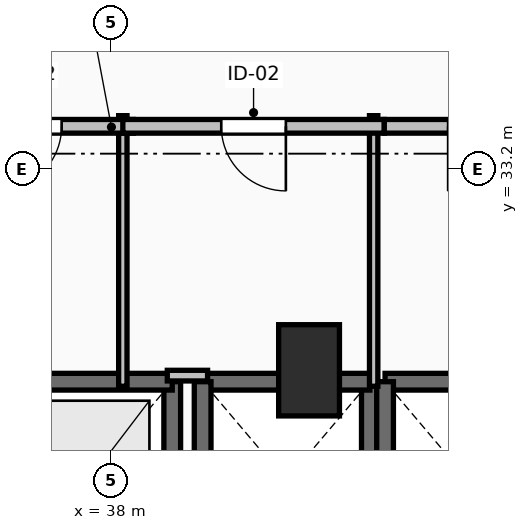
"""IFC4 building model, lengths in metres.
Left out: names, types, materials, properties, quantities, classifications, styles, units other than length and angle.
Written with IfcOpenShell. Run it as: python <this file> out.ifc"""

import sys

from ifc_helpers import new_model, si_unit, direction, frame, frame_2d, origin, origin_2d, place, context, subcontext, project, spatial, rectangle, extrude, element, fill, save


model = new_model("IFC4")
c1 = context("Model", 3, precision=1e-05, world=origin(), true_north=direction((0.0, 1.0)))
c2 = subcontext(c1, "Body", "Model", "MODEL_VIEW")
j1 = project(units=[si_unit("LENGTHUNIT", "METRE"), si_unit("PLANEANGLEUNIT", "RADIAN")], contexts=[c1])
p1 = place(None, origin())
s1 = spatial("IfcSite", under=j1, at=p1, CompositionType="ELEMENT")
p2 = place(p1, origin())
s2 = spatial("IfcBuilding", under=s1, at=p2, CompositionType="ELEMENT")
p3 = place(p2, frame((0.0, 0.0, 45.0)))
s3 = spatial("IfcBuildingStorey", under=s2, at=p3, CompositionType="ELEMENT", Elevation=45.0)
p4 = place(p3, frame((40.6, 30.55, 0.0), z_axis=(0.0, 0.0, 1.0), x_axis=(1.0, 0.0, 0.0)))
e1 = element("IfcColumn", 1, at=p4, inside=s3, PredefinedType="PILASTER", context=c2, shape_type="SweptSolid", body=[
    extrude(rectangle(XDim=0.8, YDim=1.2, at=origin_2d()), origin(), (0.0, 0.0, 1.0), 3.5),
])
p5 = place(p3, frame((38.8, 27.8, 0.0), z_axis=(0.0, 0.0, 1.0), x_axis=(0.0, 1.0, 0.0)))
e2 = element("IfcWall", 2, at=p5, inside=s3, PredefinedType="SOLIDWALL", context=c2, shape_type="SweptSolid", body=[
    extrude(rectangle(XDim=2.6, YDim=0.22, at=frame_2d((1.3, 0.0))), origin(), (0.0, 0.0, 1.0), 3.24),
])
p6 = place(p3, frame((38.8, 30.4, 0.0), z_axis=(0.0, 0.0, 1.0), x_axis=(-1.0, 0.0, 0.0)))
e3 = element("IfcWall", 3, at=p6, inside=s3, PredefinedType="SOLIDWALL", context=c2, shape_type="SweptSolid", body=[
    extrude(rectangle(XDim=2.2, YDim=0.22, at=frame_2d((1.1, 0.0))), origin(), (0.0, 0.0, 1.0), 3.24),
])
p7 = place(p3, frame((41.4, 27.8, 0.0), z_axis=(0.0, 0.0, 1.0), x_axis=(0.0, 1.0, 0.0)))
e4 = element("IfcWall", 4, at=p7, inside=s3, PredefinedType="SOLIDWALL", context=c2, shape_type="SweptSolid", body=[
    extrude(rectangle(XDim=2.6, YDim=0.22, at=frame_2d((1.3, 0.0))), origin(), (0.0, 0.0, 1.0), 3.24),
])
p8 = place(p3, frame((41.4, 30.4, 0.0), z_axis=(0.0, 0.0, 1.0), x_axis=(-1.0, 0.0, 0.0)))
e5 = element("IfcWall", 5, at=p8, inside=s3, PredefinedType="SOLIDWALL", context=c2, shape_type="SweptSolid", body=[
    extrude(rectangle(XDim=2.2, YDim=0.22, at=frame_2d((1.1, 0.0))), origin(), (0.0, 0.0, 1.0), 3.24),
])
p9 = place(p3, frame((39.2, 30.4, 0.0), z_axis=(0.0, 0.0, 1.0), x_axis=(0.0, -1.0, 0.0)))
e6 = element("IfcWall", 6, at=p9, inside=s3, PredefinedType="SOLIDWALL", context=c2, shape_type="SweptSolid", body=[
    extrude(rectangle(XDim=2.6, YDim=0.22, at=frame_2d((1.3, 0.0))), origin(), (0.0, 0.0, 1.0), 3.24),
])
p10 = place(p3, frame((43.8, 30.4, 0.0), z_axis=(0.0, 0.0, 1.0), x_axis=(-1.0, 0.0, 0.0)))
e7 = element("IfcWall", 7, at=p10, inside=s3, PredefinedType="SOLIDWALL", context=c2, shape_type="SweptSolid", body=[
    extrude(rectangle(XDim=2.2, YDim=0.22, at=frame_2d((1.1, 0.0))), origin(), (0.0, 0.0, 1.0), 3.24),
])
p11 = place(p3, frame((41.6, 30.4, 0.0), z_axis=(0.0, 0.0, 1.0), x_axis=(0.0, -1.0, 0.0)))
e8 = element("IfcWall", 8, at=p11, inside=s3, PredefinedType="SOLIDWALL", context=c2, shape_type="SweptSolid", body=[
    extrude(rectangle(XDim=2.6, YDim=0.22, at=frame_2d((1.3, 0.0))), origin(), (0.0, 0.0, 1.0), 3.24),
])
p12 = place(p3, frame((38.15, 30.34, 0.0), z_axis=(0.0, 0.0, 1.0), x_axis=(0.0, 1.0, 0.0)))
e9 = element("IfcWall", 9, at=p12, inside=s3, PredefinedType="PARTITIONING", context=c2, shape_type="SweptSolid", body=[
    extrude(rectangle(XDim=3.56, YDim=0.11, at=frame_2d((1.78, 0.0))), origin(), (0.0, 0.0, 1.0), 2.432),
])
p13 = place(p3, frame((38.29, 33.76, 0.0), z_axis=(0.0, 0.0, 1.0), x_axis=(-1.0, 0.0, 0.0)))
e10 = element("IfcWall", 10, at=p13, inside=s3, PredefinedType="PARTITIONING", context=c2, shape_type="SweptSolid", body=[
    extrude(rectangle(XDim=2.74, YDim=0.18, at=frame_2d((1.37, 0.0))), origin(), (0.0, 0.0, 1.0), 3.24),
])
p14 = place(p13, frame((0.945, 0.0, 0.0)))
e11 = element("IfcOpeningElement", 11, at=p14, cuts=e10, PredefinedType="OPENING", context=c2, shape_type="SweptSolid", body=[
    extrude(rectangle(XDim=0.85, YDim=2.1, at=frame_2d((0.425, 1.05))), frame((0.0, 0.105, 0.0), z_axis=(0.0, -1.0, 0.0), x_axis=(1.0, 0.0, 0.0)), (0.0, 0.0, 1.0), 0.21),
])
p15 = place(p3, frame((41.45, 30.34, 0.0), z_axis=(0.0, 0.0, 1.0), x_axis=(0.0, 1.0, 0.0)))
e12 = element("IfcWall", 12, at=p15, inside=s3, PredefinedType="PARTITIONING", context=c2, shape_type="SweptSolid", body=[
    extrude(rectangle(XDim=3.56, YDim=0.11, at=frame_2d((1.78, 0.0))), origin(), (0.0, 0.0, 1.0), 3.24),
])
p16 = place(p3, frame((41.59, 33.76, 0.0), z_axis=(0.0, 0.0, 1.0), x_axis=(-1.0, 0.0, 0.0)))
e13 = element("IfcWall", 13, at=p16, inside=s3, PredefinedType="PARTITIONING", context=c2, shape_type="SweptSolid", body=[
    extrude(rectangle(XDim=3.44, YDim=0.18, at=frame_2d((1.72, 0.0))), origin(), (0.0, 0.0, 1.0), 3.24),
])
p17 = place(p16, frame((1.295, 0.0, 0.0)))
e14 = element("IfcOpeningElement", 14, at=p17, cuts=e13, PredefinedType="OPENING", context=c2, shape_type="SweptSolid", body=[
    extrude(rectangle(XDim=0.85, YDim=2.1, at=frame_2d((0.425, 1.05))), frame((0.0, 0.105, 0.0), z_axis=(0.0, -1.0, 0.0), x_axis=(1.0, 0.0, 0.0)), (0.0, 0.0, 1.0), 0.21),
])
p18 = place(p3, frame((44.12, 33.76, 0.0), z_axis=(0.0, 0.0, 1.0), x_axis=(-1.0, 0.0, 0.0)))
e15 = element("IfcWall", 15, at=p18, inside=s3, PredefinedType="PARTITIONING", context=c2, shape_type="SweptSolid", body=[
    extrude(rectangle(XDim=2.53, YDim=0.18, at=frame_2d((1.265, 0.0))), origin(), (0.0, 0.0, 1.0), 3.24),
])
p19 = place(p18, frame((0.84, 0.0, 0.0)))
e16 = element("IfcOpeningElement", 16, at=p19, cuts=e15, PredefinedType="OPENING", context=c2, shape_type="SweptSolid", body=[
    extrude(rectangle(XDim=0.85, YDim=2.1, at=frame_2d((0.425, 1.05))), frame((0.0, 0.105, 0.0), z_axis=(0.0, -1.0, 0.0), x_axis=(1.0, 0.0, 0.0)), (0.0, 0.0, 1.0), 0.21),
])
p20 = place(p3, frame((38.735, 30.48, 0.0), z_axis=(0.0, 0.0, 1.0), x_axis=(1.0, 0.0, 0.0)))
e17 = element("IfcWall", 17, at=p20, inside=s3, PredefinedType="PARTITIONING", context=c2, shape_type="SweptSolid", body=[
    extrude(rectangle(XDim=0.53, YDim=0.14, at=frame_2d((0.265, 0.0))), origin(), (0.0, 0.0, 1.0), 2.432),
])
p21 = place(p14, origin())
e18 = element("IfcDoor", 18, at=p21, inside=s3, OperationType="SINGLE_SWING_RIGHT", PredefinedType="DOOR", context=c2, shape_type="SweptSolid", body=[
    extrude(rectangle(XDim=0.85, YDim=2.1, at=frame_2d((0.425, 1.05))), frame((0.0, 0.025, 0.0), z_axis=(0.0, -1.0, 0.0), x_axis=(1.0, 0.0, 0.0)), (0.0, 0.0, 1.0), 0.05),
])
fill(e11, e18)
p22 = place(p17, origin())
e19 = element("IfcDoor", 19, at=p22, inside=s3, OperationType="SINGLE_SWING_LEFT", PredefinedType="DOOR", context=c2, shape_type="SweptSolid", body=[
    extrude(rectangle(XDim=0.85, YDim=2.1, at=frame_2d((0.425, 1.05))), frame((0.0, 0.025, 0.0), z_axis=(0.0, -1.0, 0.0), x_axis=(1.0, 0.0, 0.0)), (0.0, 0.0, 1.0), 0.05),
])
fill(e14, e19)
save(model, sys.argv[1])
